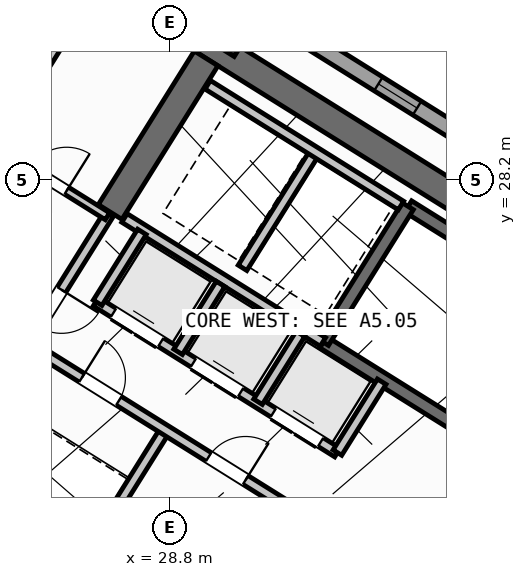
"""IFC4 building model, lengths in metres.
Left out: names, types, materials, properties, quantities, classifications, styles, units other than length and angle.
Written with IfcOpenShell. Run it as: python <this file> out.ifc"""

import sys

from ifc_helpers import new_model, si_unit, direction, frame, frame_2d, origin, origin_2d, place, context, subcontext, project, spatial, rectangle, hollow_rectangle, extrude, source, transform, mapped, element, fill, save


model = new_model("IFC4")
c1 = context("Model", 3, precision=1e-05, world=origin(), true_north=direction((0.0, 1.0)))
c2 = subcontext(c1, "Body", "Model", "MODEL_VIEW")
j1 = project(units=[si_unit("LENGTHUNIT", "METRE"), si_unit("PLANEANGLEUNIT", "RADIAN")], contexts=[c1])
p1 = place(None, origin())
s1 = spatial("IfcSite", under=j1, at=p1, CompositionType="ELEMENT")
p2 = place(p1, origin())
s2 = spatial("IfcBuilding", under=s1, at=p2, CompositionType="ELEMENT")
p3 = place(p2, frame((0.0, 0.0, 165.9)))
s3 = spatial("IfcBuildingStorey", under=s2, at=p3, CompositionType="ELEMENT", Elevation=165.9)
p4 = place(p3, frame((40.573, 24.01, 0.0), z_axis=(0.0, 0.0, 1.0), x_axis=(-0.848047359947, 0.529920442413, 0.0)))
e1 = element("IfcWall", 1, at=p4, inside=s3, PredefinedType="SHEAR", context=c2, shape_type="SweptSolid", body=[
    extrude(rectangle(XDim=13.14, YDim=0.55, at=frame_2d((6.57, 0.0))), origin(), (0.0, 0.0, 1.0), 3.32),
])
p5 = place(p3, frame((29.517, 30.594, 0.0), z_axis=(0.0, 0.0, 1.0), x_axis=(-0.529906864564, -0.848055844204, 0.0)))
e2 = element("IfcWall", 2, at=p5, inside=s3, PredefinedType="SHEAR", context=c2, shape_type="SweptSolid", body=[
    extrude(rectangle(XDim=3.575, YDim=0.55, at=frame_2d((1.788, 0.0))), origin(), (0.0, 0.0, 1.0), 3.32),
])
m1 = source(origin(), c2, "Body", "SweptSolid", [
    extrude(hollow_rectangle(XDim=0.9, YDim=0.9, WallThickness=0.036, at=origin_2d()), origin(), (0.0, 0.0, 1.0), 3.6),
])
p6 = place(p3, frame((29.928, 31.251, 0.0), z_axis=(0.0, 0.0, 1.0), x_axis=(-0.848048096156, 0.529919264233, 0.0)))
e3 = element("IfcColumn", 3, at=p6, inside=s3, PredefinedType="COLUMN", context=c2, shape_type="MappedRepresentation", body=[
    mapped(m1, transform((0.0, 0.0, 0.0), scale=1.0)),
])
p7 = place(p3, frame((29.268, 6.429, 0.0), z_axis=(0.0, 0.0, 1.0), x_axis=(-0.848049971435, 0.529916263149, 0.0)))
e4 = element("IfcWall", 4, at=p7, inside=s3, PredefinedType="STANDARD", context=c2, shape_type="SweptSolid", body=[
    extrude(rectangle(XDim=31.588, YDim=0.32, at=frame_2d((15.794, 0.0))), origin(), (0.0, 0.0, 1.0), 3.32),
])
p8 = place(p7, frame((16.362, 0.0, 0.0)))
e5 = element("IfcOpeningElement", 5, at=p8, cuts=e4, PredefinedType="OPENING", context=c2, shape_type="SweptSolid", body=[
    extrude(rectangle(XDim=1.2, YDim=2.15, at=frame_2d((0.6, 1.075))), frame((0.0, 0.17, 0.0), z_axis=(0.0, -1.0, 0.0), x_axis=(1.0, 0.0, 0.0)), (0.0, 0.0, 1.0), 0.34),
])
p9 = place(p7, frame((2.989, 0.0, 0.8)))
e6 = element("IfcOpeningElement", 6, at=p9, cuts=e4, PredefinedType="OPENING", context=c2, shape_type="SweptSolid", body=[
    extrude(rectangle(XDim=2.1, YDim=1.55, at=frame_2d((1.05, 0.775))), frame((0.0, 0.17, 0.0), z_axis=(0.0, -1.0, 0.0), x_axis=(1.0, 0.0, 0.0)), (0.0, 0.0, 1.0), 0.34),
])
p10 = place(p7, frame((8.359, 0.0, 0.8)))
e7 = element("IfcOpeningElement", 7, at=p10, cuts=e4, PredefinedType="OPENING", context=c2, shape_type="SweptSolid", body=[
    extrude(rectangle(XDim=2.1, YDim=1.55, at=frame_2d((1.05, 0.775))), frame((0.0, 0.17, 0.0), z_axis=(0.0, -1.0, 0.0), x_axis=(1.0, 0.0, 0.0)), (0.0, 0.0, 1.0), 0.34),
])
p11 = place(p7, frame((13.284, 0.0, 0.95)))
e8 = element("IfcOpeningElement", 8, at=p11, cuts=e4, PredefinedType="OPENING", context=c2, shape_type="SweptSolid", body=[
    extrude(rectangle(XDim=1.2, YDim=1.4, at=frame_2d((0.6, 0.7))), frame((0.0, 0.17, 0.0), z_axis=(0.0, -1.0, 0.0), x_axis=(1.0, 0.0, 0.0)), (0.0, 0.0, 1.0), 0.34),
])
p12 = place(p7, frame((20.39, 0.0, 0.95)))
e9 = element("IfcOpeningElement", 9, at=p12, cuts=e4, PredefinedType="OPENING", context=c2, shape_type="SweptSolid", body=[
    extrude(rectangle(XDim=1.2, YDim=1.4, at=frame_2d((0.6, 0.7))), frame((0.0, 0.17, 0.0), z_axis=(0.0, -1.0, 0.0), x_axis=(1.0, 0.0, 0.0)), (0.0, 0.0, 1.0), 0.34),
])
p13 = place(p7, frame((23.715, 0.0, 1.0)))
e10 = element("IfcOpeningElement", 10, at=p13, cuts=e4, PredefinedType="OPENING", context=c2, shape_type="SweptSolid", body=[
    extrude(rectangle(XDim=0.9, YDim=1.25, at=frame_2d((0.45, 0.625))), frame((0.0, 0.17, 0.0), z_axis=(0.0, -1.0, 0.0), x_axis=(1.0, 0.0, 0.0)), (0.0, 0.0, 1.0), 0.34),
])
p14 = place(p7, frame((26.106, 0.0, 0.85)))
e11 = element("IfcOpeningElement", 11, at=p14, cuts=e4, PredefinedType="OPENING", context=c2, shape_type="SweptSolid", body=[
    extrude(rectangle(XDim=1.5, YDim=1.5, at=frame_2d((0.75, 0.75))), frame((0.0, 0.17, 0.0), z_axis=(0.0, -1.0, 0.0), x_axis=(1.0, 0.0, 0.0)), (0.0, 0.0, 1.0), 0.34),
])
p15 = place(p7, frame((29.068, 0.0, 0.85)))
e12 = element("IfcOpeningElement", 12, at=p15, cuts=e4, PredefinedType="OPENING", context=c2, shape_type="SweptSolid", body=[
    extrude(rectangle(XDim=1.8, YDim=1.5, at=frame_2d((0.9, 0.75))), frame((0.0, 0.17, 0.0), z_axis=(0.0, -1.0, 0.0), x_axis=(1.0, 0.0, 0.0)), (0.0, 0.0, 1.0), 0.34),
])
p16 = place(p3, frame((14.138, 41.825, 0.0), z_axis=(0.0, 0.0, 1.0), x_axis=(0.848046498049, -0.529921821731, 0.0)))
e13 = element("IfcWall", 13, at=p16, inside=s3, PredefinedType="STANDARD", context=c2, shape_type="SweptSolid", body=[
    extrude(rectangle(XDim=31.588, YDim=0.32, at=frame_2d((15.794, 0.0))), origin(), (0.0, 0.0, 1.0), 3.32),
])
p17 = place(p16, frame((3.253, 0.0, 0.0)))
e14 = element("IfcOpeningElement", 14, at=p17, cuts=e13, PredefinedType="OPENING", context=c2, shape_type="SweptSolid", body=[
    extrude(rectangle(XDim=1.05, YDim=2.15, at=frame_2d((0.525, 1.075))), frame((0.0, 0.17, 0.0), z_axis=(0.0, -1.0, 0.0), x_axis=(1.0, 0.0, 0.0)), (0.0, 0.0, 1.0), 0.34),
])
p18 = place(p16, frame((0.863, 0.0, 0.85)))
e15 = element("IfcOpeningElement", 15, at=p18, cuts=e13, PredefinedType="OPENING", context=c2, shape_type="SweptSolid", body=[
    extrude(rectangle(XDim=1.8, YDim=1.5, at=frame_2d((0.9, 0.75))), frame((0.0, 0.17, 0.0), z_axis=(0.0, -1.0, 0.0), x_axis=(1.0, 0.0, 0.0)), (0.0, 0.0, 1.0), 0.34),
])
p19 = place(p16, frame((8.494, 0.0, 0.85)))
e16 = element("IfcOpeningElement", 16, at=p19, cuts=e13, PredefinedType="OPENING", context=c2, shape_type="SweptSolid", body=[
    extrude(rectangle(XDim=1.8, YDim=1.5, at=frame_2d((0.9, 0.75))), frame((0.0, 0.17, 0.0), z_axis=(0.0, -1.0, 0.0), x_axis=(1.0, 0.0, 0.0)), (0.0, 0.0, 1.0), 0.34),
])
p20 = place(p16, frame((13.874, 0.0, 0.85)))
e17 = element("IfcOpeningElement", 17, at=p20, cuts=e13, PredefinedType="OPENING", context=c2, shape_type="SweptSolid", body=[
    extrude(rectangle(XDim=1.5, YDim=1.5, at=frame_2d((0.75, 0.75))), frame((0.0, 0.17, 0.0), z_axis=(0.0, -1.0, 0.0), x_axis=(1.0, 0.0, 0.0)), (0.0, 0.0, 1.0), 0.34),
])
p21 = place(p16, frame((17.104, 0.0, 1.0)))
e18 = element("IfcOpeningElement", 18, at=p21, cuts=e13, PredefinedType="OPENING", context=c2, shape_type="SweptSolid", body=[
    extrude(rectangle(XDim=0.9, YDim=1.25, at=frame_2d((0.45, 0.625))), frame((0.0, 0.17, 0.0), z_axis=(0.0, -1.0, 0.0), x_axis=(1.0, 0.0, 0.0)), (0.0, 0.0, 1.0), 0.34),
])
p22 = place(p16, frame((22.144, 0.0, 1.0)))
e19 = element("IfcOpeningElement", 19, at=p22, cuts=e13, PredefinedType="OPENING", context=c2, shape_type="SweptSolid", body=[
    extrude(rectangle(XDim=0.9, YDim=1.25, at=frame_2d((0.45, 0.625))), frame((0.0, 0.17, 0.0), z_axis=(0.0, -1.0, 0.0), x_axis=(1.0, 0.0, 0.0)), (0.0, 0.0, 1.0), 0.34),
])
p23 = place(p16, frame((27.744, 0.0, 1.0)))
e20 = element("IfcOpeningElement", 20, at=p23, cuts=e13, PredefinedType="OPENING", context=c2, shape_type="SweptSolid", body=[
    extrude(rectangle(XDim=0.9, YDim=1.25, at=frame_2d((0.45, 0.625))), frame((0.0, 0.17, 0.0), z_axis=(0.0, -1.0, 0.0), x_axis=(1.0, 0.0, 0.0)), (0.0, 0.0, 1.0), 0.34),
])
p24 = place(p3, frame((31.28, 18.261, 0.0), z_axis=(0.0, 0.0, 1.0), x_axis=(-0.848051618787, 0.529913626805, 0.0)))
e21 = element("IfcWall", 21, at=p24, inside=s3, PredefinedType="SHEAR", context=c2, shape_type="SweptSolid", body=[
    extrude(rectangle(XDim=7.46, YDim=0.26, at=frame_2d((3.73, 0.0))), origin(), (0.0, 0.0, 1.0), 3.32),
])
p25 = place(p24, frame((0.36, 0.0, 0.0)))
e22 = element("IfcOpeningElement", 22, at=p25, cuts=e21, PredefinedType="OPENING", context=c2, shape_type="SweptSolid", body=[
    extrude(rectangle(XDim=0.86, YDim=2.05, at=frame_2d((0.43, 1.025))), frame((0.0, 0.14, 0.0), z_axis=(0.0, -1.0, 0.0), x_axis=(1.0, 0.0, 0.0)), (0.0, 0.0, 1.0), 0.28),
])
p26 = place(p3, frame((39.721, 23.788, 0.0), z_axis=(0.0, 0.0, 1.0), x_axis=(-0.848054434086, 0.529909121291, 0.0)))
e23 = element("IfcWall", 23, at=p26, inside=s3, PredefinedType="SHEAR", context=c2, shape_type="SweptSolid", body=[
    extrude(rectangle(XDim=7.33, YDim=0.26, at=frame_2d((3.665, 0.0))), origin(), (0.0, 0.0, 1.0), 3.32),
])
p27 = place(p3, frame((38.046, 21.108, 0.0), z_axis=(0.0, 0.0, 1.0), x_axis=(-0.848054434086, 0.529909121291, 0.0)))
e24 = element("IfcWall", 24, at=p27, inside=s3, PredefinedType="SHEAR", context=c2, shape_type="SweptSolid", body=[
    extrude(rectangle(XDim=7.33, YDim=0.26, at=frame_2d((3.665, 0.0))), origin(), (0.0, 0.0, 1.0), 3.32),
])
p28 = place(p27, frame((0.22, 0.0, 0.0)))
e25 = element("IfcOpeningElement", 25, at=p28, cuts=e24, PredefinedType="OPENING", context=c2, shape_type="SweptSolid", body=[
    extrude(rectangle(XDim=1.1, YDim=2.1, at=frame_2d((0.55, 1.05))), frame((0.0, 0.14, 0.0), z_axis=(0.0, -1.0, 0.0), x_axis=(1.0, 0.0, 0.0)), (0.0, 0.0, 1.0), 0.28),
])
p29 = place(p3, frame((33.496, 27.677, 0.0), z_axis=(0.0, 0.0, 1.0), x_axis=(-0.529908658664, -0.84805472316, 0.0)))
e26 = element("IfcWall", 26, at=p29, inside=s3, PredefinedType="SHEAR", context=c2, shape_type="SweptSolid", body=[
    extrude(rectangle(XDim=3.16, YDim=0.26, at=frame_2d((1.58, 0.0))), origin(), (0.0, 0.0, 1.0), 3.32),
])
p30 = place(p3, frame((31.822, 24.998, 0.0), z_axis=(0.0, 0.0, 1.0), x_axis=(-0.848036912365, 0.52993716162, 0.0)))
e27 = element("IfcWall", 27, at=p30, inside=s3, PredefinedType="STANDARD", context=c2, shape_type="SweptSolid", body=[
    extrude(rectangle(XDim=4.618, YDim=0.2, at=frame_2d((2.309, 0.0))), origin(), (0.0, 0.0, 1.0), 3.31),
])
p31 = place(p3, frame((32.108, 22.814, 0.0), z_axis=(0.0, 0.0, 1.0), x_axis=(-0.848042229521, 0.529928652696, 0.0)))
e28 = element("IfcWall", 28, at=p31, inside=s3, PredefinedType="STANDARD", context=c2, shape_type="SweptSolid", body=[
    extrude(rectangle(XDim=5.62, YDim=0.2, at=frame_2d((2.81, 0.0))), origin(), (0.0, 0.0, 1.0), 3.31),
])
p32 = place(p31, frame((0.39, 0.0, 0.0)))
e29 = element("IfcOpeningElement", 29, at=p32, cuts=e28, PredefinedType="OPENING", context=c2, shape_type="SweptSolid", body=[
    extrude(rectangle(XDim=1.1, YDim=2.15, at=frame_2d((0.55, 1.075))), frame((0.0, 0.11, 0.0), z_axis=(0.0, -1.0, 0.0), x_axis=(1.0, 0.0, 0.0)), (0.0, 0.0, 1.0), 0.22),
])
p33 = place(p31, frame((2.25, 0.0, 0.0)))
e30 = element("IfcOpeningElement", 30, at=p33, cuts=e28, PredefinedType="OPENING", context=c2, shape_type="SweptSolid", body=[
    extrude(rectangle(XDim=1.1, YDim=2.15, at=frame_2d((0.55, 1.075))), frame((0.0, 0.11, 0.0), z_axis=(0.0, -1.0, 0.0), x_axis=(1.0, 0.0, 0.0)), (0.0, 0.0, 1.0), 0.22),
])
p34 = place(p31, frame((4.11, 0.0, 0.0)))
e31 = element("IfcOpeningElement", 31, at=p34, cuts=e28, PredefinedType="OPENING", context=c2, shape_type="SweptSolid", body=[
    extrude(rectangle(XDim=1.1, YDim=2.15, at=frame_2d((0.55, 1.075))), frame((0.0, 0.11, 0.0), z_axis=(0.0, -1.0, 0.0), x_axis=(1.0, 0.0, 0.0)), (0.0, 0.0, 1.0), 0.22),
])
p35 = place(p3, frame((32.982, 24.213, 0.0), z_axis=(0.0, 0.0, 1.0), x_axis=(-0.529839334948, -0.84809803628, 0.0)))
e32 = element("IfcWall", 32, at=p35, inside=s3, PredefinedType="STANDARD", context=c2, shape_type="SweptSolid", body=[
    extrude(rectangle(XDim=1.65, YDim=0.2, at=frame_2d((0.825, 0.0))), origin(), (0.0, 0.0, 1.0), 3.31),
])
p36 = place(p3, frame((28.25, 27.17, 0.0), z_axis=(0.0, 0.0, 1.0), x_axis=(-0.529905827651, -0.848056492117, 0.0)))
e33 = element("IfcWall", 33, at=p36, inside=s3, PredefinedType="STANDARD", context=c2, shape_type="SweptSolid", body=[
    extrude(rectangle(XDim=1.65, YDim=0.2, at=frame_2d((0.825, 0.0))), origin(), (0.0, 0.0, 1.0), 3.31),
])
p37 = place(p3, frame((31.645, 28.716, 0.0), z_axis=(0.0, 0.0, 1.0), x_axis=(-0.52986693015, -0.848080795876, 0.0)))
e34 = element("IfcWall", 34, at=p37, inside=s3, PredefinedType="STANDARD", context=c2, shape_type="SweptSolid", body=[
    extrude(rectangle(XDim=2.66, YDim=0.2, at=frame_2d((1.33, 0.0))), origin(), (0.0, 0.0, 1.0), 3.31),
])
p38 = place(p3, frame((33.363, 27.69, 0.0), z_axis=(0.0, 0.0, 1.0), x_axis=(-0.848047090064, 0.529920874315, 0.0)))
e35 = element("IfcWall", 35, at=p38, inside=s3, PredefinedType="STANDARD", context=c2, shape_type="SweptSolid", body=[
    extrude(rectangle(XDim=4.498, YDim=0.2, at=frame_2d((2.249, 0.0))), origin(), (0.0, 0.0, 1.0), 3.31),
])
for number, where, z_axis, x_axis in (
    (36, (31.379, 25.156, 0.0), (0.0, 0.0, 1.0), (-0.53, -0.848, 0.0)),
    (37, (29.801, 26.142, 0.0), (0.0, 0.0, 1.0), (-0.53, -0.848, 0.0)),
):
    element("IfcWall", number, at=place(p3, frame(where, z_axis=z_axis, x_axis=x_axis)), inside=s3, PredefinedType="STANDARD", context=c2, shape_type="SweptSolid", body=[
        extrude(rectangle(XDim=1.58, YDim=0.2, at=frame_2d((0.79, 0.0))), origin(), (0.0, 0.0, 1.0), 3.31),
    ])
p39 = place(p3, frame((28.71, 23.263, 0.0), z_axis=(0.0, 0.0, 1.0), x_axis=(-0.529907497854, -0.848055448493, 0.0)))
e38 = element("IfcWall", 38, at=p39, inside=s3, PredefinedType="STANDARD", context=c2, shape_type="SweptSolid", body=[
    extrude(rectangle(XDim=2.88, YDim=0.2, at=frame_2d((1.44, 0.0))), origin(), (0.0, 0.0, 1.0), 3.31),
])
p40 = place(p3, frame((31.525, 21.504, 0.0), z_axis=(0.0, 0.0, 1.0), x_axis=(-0.848040211232, 0.529931882541, 0.0)))
e39 = element("IfcWall", 39, at=p40, inside=s3, PredefinedType="STANDARD", context=c2, shape_type="SweptSolid", body=[
    extrude(rectangle(XDim=6.218, YDim=0.2, at=frame_2d((3.109, 0.0))), origin(), (0.0, 0.0, 1.0), 3.31),
])
p41 = place(p40, frame((4.4, 0.0, 0.0)))
e40 = element("IfcOpeningElement", 40, at=p41, cuts=e39, PredefinedType="OPENING", context=c2, shape_type="SweptSolid", body=[
    extrude(rectangle(XDim=0.86, YDim=2.05, at=frame_2d((0.43, 1.025))), frame((0.0, 0.11, 0.0), z_axis=(0.0, -1.0, 0.0), x_axis=(1.0, 0.0, 0.0)), (0.0, 0.0, 1.0), 0.22),
])
p42 = place(p40, frame((1.45, 0.0, 0.0)))
e41 = element("IfcOpeningElement", 41, at=p42, cuts=e39, PredefinedType="OPENING", context=c2, shape_type="SweptSolid", body=[
    extrude(rectangle(XDim=0.86, YDim=2.05, at=frame_2d((0.43, 1.025))), frame((0.0, 0.11, 0.0), z_axis=(0.0, -1.0, 0.0), x_axis=(1.0, 0.0, 0.0)), (0.0, 0.0, 1.0), 0.22),
])
p43 = place(p3, frame((27.596, 27.52, 0.0), z_axis=(0.0, 0.0, 1.0), x_axis=(-0.529865479138, -0.848081702443, 0.0)))
e42 = element("IfcWall", 42, at=p43, inside=s3, PredefinedType="STANDARD", context=c2, shape_type="SweptSolid", body=[
    extrude(rectangle(XDim=2.96, YDim=0.2, at=frame_2d((1.48, 0.0))), origin(), (0.0, 0.0, 1.0), 3.31),
])
p44 = place(p43, frame((1.76, 0.0, 0.0)))
e43 = element("IfcOpeningElement", 43, at=p44, cuts=e42, PredefinedType="OPENING", context=c2, shape_type="SweptSolid", body=[
    extrude(rectangle(XDim=0.86, YDim=2.05, at=frame_2d((0.43, 1.025))), frame((0.0, 0.11, 0.0), z_axis=(0.0, -1.0, 0.0), x_axis=(1.0, 0.0, 0.0)), (0.0, 0.0, 1.0), 0.22),
])
p45 = place(p3, frame((27.57, 27.478, 0.0), z_axis=(0.0, 0.0, 1.0), x_axis=(-0.848050851465, 0.529914854792, 0.0)))
e44 = element("IfcWall", 44, at=p45, inside=s3, PredefinedType="PARTITIONING", context=c2, shape_type="SweptSolid", body=[
    extrude(rectangle(XDim=2.61, YDim=0.16, at=frame_2d((1.305, 0.0))), origin(), (0.0, 0.0, 1.0), 3.31),
])
p46 = place(p45, frame((0.95, 0.0, 0.0)))
e45 = element("IfcOpeningElement", 45, at=p46, cuts=e44, PredefinedType="OPENING", context=c2, shape_type="SweptSolid", body=[
    extrude(rectangle(XDim=0.86, YDim=2.05, at=frame_2d((0.43, 1.025))), frame((0.0, 0.09, 0.0), z_axis=(0.0, -1.0, 0.0), x_axis=(1.0, 0.0, 0.0)), (0.0, 0.0, 1.0), 0.18),
])
p47 = place(p3, frame((27.953, 33.016, 0.0), z_axis=(0.0, 0.0, 1.0), x_axis=(-0.529906322364, -0.848056182997, 0.0)))
e46 = element("IfcWall", 46, at=p47, inside=s3, PredefinedType="PARTITIONING", context=c2, shape_type="SweptSolid", body=[
    extrude(rectangle(XDim=5.45, YDim=0.16, at=frame_2d((2.725, 0.0))), origin(), (0.0, 0.0, 1.0), 3.31),
])
m2 = source(origin(), c2, "Body", "SweptSolid", [
    extrude(rectangle(XDim=0.9, YDim=1.25, at=frame_2d((0.45, 0.625))), frame((0.0, 0.03, 0.0), z_axis=(0.0, -1.0, 0.0), x_axis=(1.0, 0.0, 0.0)), (0.0, 0.0, 1.0), 0.06),
])
p48 = place(p22, origin())
e47 = element("IfcWindow", 47, at=p48, inside=s3, PartitioningType="SINGLE_PANEL", PredefinedType="WINDOW", context=c2, shape_type="MappedRepresentation", body=[
    mapped(m2, transform((0.0, 0.0, 0.0), scale=1.0)),
])
fill(e19, e47)
m3 = source(origin(), c2, "Body", "SweptSolid", [
    extrude(rectangle(XDim=1.1, YDim=2.15, at=frame_2d((0.55, 1.075))), frame((0.0, 0.025, 0.0), z_axis=(0.0, -1.0, 0.0), x_axis=(1.0, 0.0, 0.0)), (0.0, 0.0, 1.0), 0.05),
])
p49 = place(p32, origin())
e48 = element("IfcDoor", 48, at=p49, inside=s3, OperationType="DOUBLE_DOOR_SLIDING", PredefinedType="DOOR", context=c2, shape_type="MappedRepresentation", body=[
    mapped(m3, transform((0.0, 0.0, 0.0), scale=1.0)),
])
fill(e29, e48)
p50 = place(p33, origin())
e49 = element("IfcDoor", 49, at=p50, inside=s3, OperationType="DOUBLE_DOOR_SLIDING", PredefinedType="DOOR", context=c2, shape_type="MappedRepresentation", body=[
    mapped(m3, transform((0.0, 0.0, 0.0), scale=1.0)),
])
fill(e30, e49)
p51 = place(p34, origin())
e50 = element("IfcDoor", 50, at=p51, inside=s3, OperationType="DOUBLE_DOOR_SLIDING", PredefinedType="DOOR", context=c2, shape_type="MappedRepresentation", body=[
    mapped(m3, transform((0.0, 0.0, 0.0), scale=1.0)),
])
fill(e31, e50)
m4 = source(origin(), c2, "Body", "SweptSolid", [
    extrude(rectangle(XDim=0.86, YDim=2.05, at=frame_2d((0.43, 1.025))), frame((0.0, 0.025, 0.0), z_axis=(0.0, -1.0, 0.0), x_axis=(1.0, 0.0, 0.0)), (0.0, 0.0, 1.0), 0.05),
])
p52 = place(p41, frame((0.86, 0.0, 0.0), z_axis=(0.0, 0.0, 1.0), x_axis=(-1.0, 0.0, 0.0)))
e51 = element("IfcDoor", 51, at=p52, inside=s3, OperationType="SINGLE_SWING_LEFT", PredefinedType="DOOR", context=c2, shape_type="MappedRepresentation", body=[
    mapped(m4, transform((0.0, 0.0, 0.0), scale=1.0)),
])
fill(e40, e51)
p53 = place(p42, frame((0.86, 0.0, 0.0), z_axis=(0.0, 0.0, 1.0), x_axis=(-1.0, 0.0, 0.0)))
e52 = element("IfcDoor", 52, at=p53, inside=s3, OperationType="SINGLE_SWING_RIGHT", PredefinedType="DOOR", context=c2, shape_type="MappedRepresentation", body=[
    mapped(m4, transform((0.0, 0.0, 0.0), scale=1.0)),
])
fill(e41, e52)
p54 = place(p46, frame((0.86, 0.0, 0.0), z_axis=(0.0, 0.0, 1.0), x_axis=(-1.0, 0.0, 0.0)))
e53 = element("IfcDoor", 53, at=p54, inside=s3, OperationType="SINGLE_SWING_RIGHT", PredefinedType="DOOR", context=c2, shape_type="MappedRepresentation", body=[
    mapped(m4, transform((0.0, 0.0, 0.0), scale=1.0)),
])
fill(e45, e53)
p55 = place(p44, origin())
e54 = element("IfcDoor", 54, at=p55, inside=s3, OperationType="SINGLE_SWING_LEFT", PredefinedType="DOOR", context=c2, shape_type="MappedRepresentation", body=[
    mapped(m4, transform((0.0, 0.0, 0.0), scale=1.0)),
])
fill(e43, e54)
save(model, sys.argv[1])
